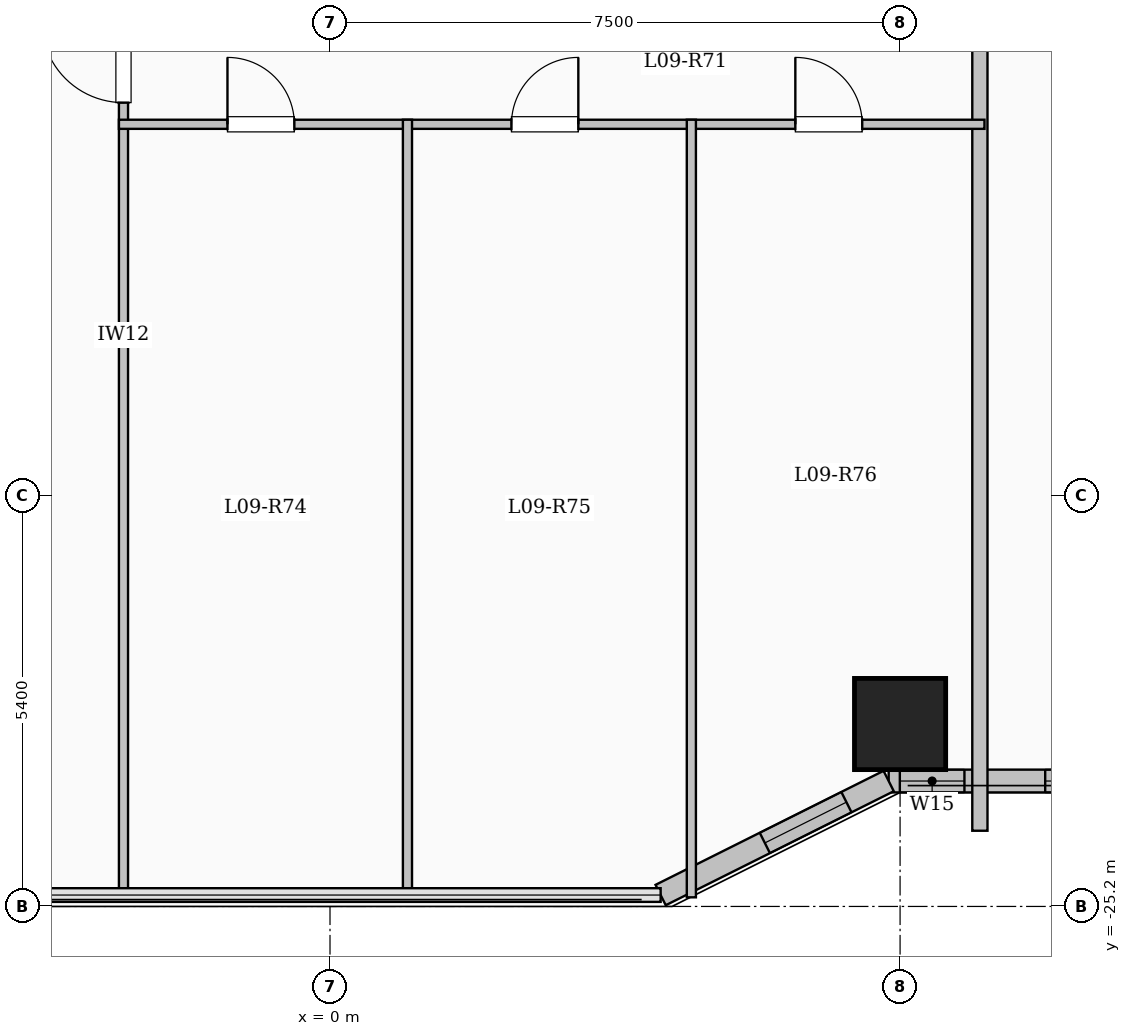
"""IFC4 building model, lengths in metres.
Left out: names, types, materials, properties, quantities, classifications, styles, units other than length and angle.
Written with IfcOpenShell. Run it as: python <this file> out.ifc"""

import sys

from ifc_helpers import new_model, si_unit, direction, frame, frame_2d, origin, origin_2d, place, context, subcontext, project, spatial, rectangle, extrude, element, fill, save


model = new_model("IFC4")
c1 = context("Model", 3, precision=1e-05, world=origin(), true_north=direction((0.0, 1.0)))
c2 = subcontext(c1, "Body", "Model", "MODEL_VIEW")
j1 = project(units=[si_unit("LENGTHUNIT", "METRE"), si_unit("PLANEANGLEUNIT", "RADIAN")], contexts=[c1])
p1 = place(None, origin())
s1 = spatial("IfcSite", under=j1, at=p1, CompositionType="ELEMENT")
p2 = place(p1, origin())
s2 = spatial("IfcBuilding", under=s1, at=p2, CompositionType="ELEMENT")
p3 = place(p2, frame((0.0, 0.0, 37.4)))
s3 = spatial("IfcBuildingStorey", under=s2, at=p3, CompositionType="ELEMENT", Elevation=37.4)
p4 = place(p3, frame((7.5, -22.8, 0.0), z_axis=(0.0, 0.0, 1.0), x_axis=(1.0, 0.0, 0.0)))
e1 = element("IfcColumn", 1, at=p4, inside=s3, PredefinedType="COLUMN", context=c2, shape_type="SweptSolid", body=[
    extrude(rectangle(XDim=1.2, YDim=1.2, at=origin_2d()), origin(), (0.0, 0.0, 1.0), 3.35),
])
p5 = place(p3, frame((22.65, -23.55, 0.0), z_axis=(0.0, 0.0, 1.0), x_axis=(-1.0, 0.0, 0.0)))
e2 = element("IfcWall", 2, at=p5, inside=s3, PredefinedType="SOLIDWALL", context=c2, shape_type="SweptSolid", body=[
    extrude(rectangle(XDim=15.3, YDim=0.3, at=frame_2d((7.65, 0.0))), origin(), (0.0, 0.0, 1.0), 3.1),
])
p6 = place(p5, frame((0.88, 0.0, 0.9)))
e3 = element("IfcOpeningElement", 3, at=p6, cuts=e2, PredefinedType="OPENING", context=c2, shape_type="SweptSolid", body=[
    extrude(rectangle(XDim=1.5, YDim=1.65, at=frame_2d((0.75, 0.825))), frame((0.0, 0.16, 0.0), z_axis=(0.0, -1.0, 0.0), x_axis=(1.0, 0.0, 0.0)), (0.0, 0.0, 1.0), 0.32),
])
p7 = place(p5, frame((4.091, 0.0, 0.9)))
e4 = element("IfcOpeningElement", 4, at=p7, cuts=e2, PredefinedType="OPENING", context=c2, shape_type="SweptSolid", body=[
    extrude(rectangle(XDim=1.5, YDim=1.65, at=frame_2d((0.75, 0.825))), frame((0.0, 0.16, 0.0), z_axis=(0.0, -1.0, 0.0), x_axis=(1.0, 0.0, 0.0)), (0.0, 0.0, 1.0), 0.32),
])
p8 = place(p5, frame((7.045, 0.0, 0.95)))
e5 = element("IfcOpeningElement", 5, at=p8, cuts=e2, PredefinedType="OPENING", context=c2, shape_type="SweptSolid", body=[
    extrude(rectangle(XDim=1.2, YDim=1.5, at=frame_2d((0.6, 0.75))), frame((0.0, 0.16, 0.0), z_axis=(0.0, -1.0, 0.0), x_axis=(1.0, 0.0, 0.0)), (0.0, 0.0, 1.0), 0.32),
])
p9 = place(p5, frame((9.212, 0.0, 0.95)))
e6 = element("IfcOpeningElement", 6, at=p9, cuts=e2, PredefinedType="OPENING", context=c2, shape_type="SweptSolid", body=[
    extrude(rectangle(XDim=1.2, YDim=1.5, at=frame_2d((0.6, 0.75))), frame((0.0, 0.16, 0.0), z_axis=(0.0, -1.0, 0.0), x_axis=(1.0, 0.0, 0.0)), (0.0, 0.0, 1.0), 0.32),
])
p10 = place(p5, frame((11.741, 0.0, 0.9)))
e7 = element("IfcOpeningElement", 7, at=p10, cuts=e2, PredefinedType="OPENING", context=c2, shape_type="SweptSolid", body=[
    extrude(rectangle(XDim=1.5, YDim=1.65, at=frame_2d((0.75, 0.825))), frame((0.0, 0.16, 0.0), z_axis=(0.0, -1.0, 0.0), x_axis=(1.0, 0.0, 0.0)), (0.0, 0.0, 1.0), 0.32),
])
p11 = place(p5, frame((14.303, 0.0, 0.95)))
e8 = element("IfcOpeningElement", 8, at=p11, cuts=e2, PredefinedType="OPENING", context=c2, shape_type="SweptSolid", body=[
    extrude(rectangle(XDim=0.85, YDim=1.5, at=frame_2d((0.425, 0.75))), frame((0.0, 0.16, 0.0), z_axis=(0.0, -1.0, 0.0), x_axis=(1.0, 0.0, 0.0)), (0.0, 0.0, 1.0), 0.32),
])
p12 = place(p3, frame((7.35, -23.55, 0.0), z_axis=(0.0, 0.0, 1.0), x_axis=(-0.894427191, -0.4472135955, 0.0)))
e9 = element("IfcWall", 9, at=p12, inside=s3, PredefinedType="SOLIDWALL", context=c2, shape_type="SweptSolid", body=[
    extrude(rectangle(XDim=3.354, YDim=0.3, at=frame_2d((1.677, 0.0))), origin(), (0.0, 0.0, 1.0), 3.1),
])
p13 = place(p12, frame((0.622, 0.0, 0.95)))
e10 = element("IfcOpeningElement", 10, at=p13, cuts=e9, PredefinedType="OPENING", context=c2, shape_type="SweptSolid", body=[
    extrude(rectangle(XDim=1.2, YDim=1.5, at=frame_2d((0.6, 0.75))), frame((0.0, 0.16, 0.0), z_axis=(0.0, -1.0, 0.0), x_axis=(1.0, 0.0, 0.0)), (0.0, 0.0, 1.0), 0.32),
])
p14 = place(p3, frame((8.55, -24.204, 0.0), z_axis=(0.0, 0.0, 1.0), x_axis=(0.0, 1.0, 0.0)))
e11 = element("IfcWall", 11, at=p14, inside=s3, PredefinedType="SOLIDWALL", context=c2, shape_type="SweptSolid", body=[
    extrude(rectangle(XDim=13.854, YDim=0.2, at=frame_2d((6.927, 0.0))), origin(), (0.0, 0.0, 1.0), 3.1),
])
p15 = place(p3, frame((-2.717, -25.08, 0.0), z_axis=(0.0, 0.0, 1.0), x_axis=(0.0, 1.0, 0.0)))
e12 = element("IfcWall", 12, at=p15, inside=s3, PredefinedType="PARTITIONING", context=c2, shape_type="SweptSolid", body=[
    extrude(rectangle(XDim=14.79, YDim=0.12, at=frame_2d((7.395, 0.0))), origin(), (0.0, 0.0, 1.0), 3.1),
])
p16 = place(p15, frame((10.455, 0.0, 0.0)))
e13 = element("IfcOpeningElement", 13, at=p16, cuts=e12, PredefinedType="OPENING", context=c2, shape_type="SweptSolid", body=[
    extrude(rectangle(XDim=1.08, YDim=2.15, at=frame_2d((0.54, 1.075))), frame((0.0, 0.07, 0.0), z_axis=(0.0, -1.0, 0.0), x_axis=(1.0, 0.0, 0.0)), (0.0, 0.0, 1.0), 0.14),
])
p17 = place(p3, frame((-2.777, -14.91, 0.0), z_axis=(0.0, 0.0, 1.0), x_axis=(1.0, 0.0, 0.0)))
e14 = element("IfcWall", 14, at=p17, inside=s3, PredefinedType="PARTITIONING", context=c2, shape_type="SweptSolid", body=[
    extrude(rectangle(XDim=11.387, YDim=0.12, at=frame_2d((5.694, 0.0))), origin(), (0.0, 0.0, 1.0), 2.585),
])
p18 = place(p17, frame((1.428, 0.0, 0.0)))
e15 = element("IfcOpeningElement", 15, at=p18, cuts=e14, PredefinedType="OPENING", context=c2, shape_type="SweptSolid", body=[
    extrude(rectangle(XDim=0.88, YDim=2.1, at=frame_2d((0.44, 1.05))), frame((0.0, 0.07, 0.0), z_axis=(0.0, -1.0, 0.0), x_axis=(1.0, 0.0, 0.0)), (0.0, 0.0, 1.0), 0.14),
])
p19 = place(p17, frame((5.164, 0.0, 0.0)))
e16 = element("IfcOpeningElement", 16, at=p19, cuts=e14, PredefinedType="OPENING", context=c2, shape_type="SweptSolid", body=[
    extrude(rectangle(XDim=0.88, YDim=2.1, at=frame_2d((0.44, 1.05))), frame((0.0, 0.07, 0.0), z_axis=(0.0, -1.0, 0.0), x_axis=(1.0, 0.0, 0.0)), (0.0, 0.0, 1.0), 0.14),
])
p20 = place(p17, frame((8.899, 0.0, 0.0)))
e17 = element("IfcOpeningElement", 17, at=p20, cuts=e14, PredefinedType="OPENING", context=c2, shape_type="SweptSolid", body=[
    extrude(rectangle(XDim=0.88, YDim=2.1, at=frame_2d((0.44, 1.05))), frame((0.0, 0.07, 0.0), z_axis=(0.0, -1.0, 0.0), x_axis=(1.0, 0.0, 0.0)), (0.0, 0.0, 1.0), 0.14),
])
for number, where, z_axis, x_axis in (
    (18, (1.019, -25.08, 0.0), (0.0, 0.0, 1.0), (0.0, 1.0, 0.0)),
    (19, (4.754, -25.08, 0.0), (0.0, 0.0, 1.0), (0.0, 1.0, 0.0)),
):
    element("IfcWall", number, at=place(p3, frame(where, z_axis=z_axis, x_axis=x_axis)), inside=s3, PredefinedType="PARTITIONING", context=c2, shape_type="SweptSolid", body=[
        extrude(rectangle(XDim=10.23, YDim=0.12, at=frame_2d((5.115, 0.0))), origin(), (0.0, 0.0, 1.0), 3.1),
    ])
p21 = place(p10, origin())
e20 = element("IfcWindow", 20, at=p21, inside=s3, PartitioningType="SINGLE_PANEL", PredefinedType="WINDOW", context=c2, shape_type="SweptSolid", body=[
    extrude(rectangle(XDim=1.5, YDim=1.65, at=frame_2d((0.75, 0.825))), frame((0.0, 0.03, 0.0), z_axis=(0.0, -1.0, 0.0), x_axis=(1.0, 0.0, 0.0)), (0.0, 0.0, 1.0), 0.06),
])
fill(e7, e20)
p22 = place(p11, origin())
e21 = element("IfcWindow", 21, at=p22, inside=s3, PartitioningType="SINGLE_PANEL", PredefinedType="WINDOW", context=c2, shape_type="SweptSolid", body=[
    extrude(rectangle(XDim=0.85, YDim=1.5, at=frame_2d((0.425, 0.75))), frame((0.0, 0.03, 0.0), z_axis=(0.0, -1.0, 0.0), x_axis=(1.0, 0.0, 0.0)), (0.0, 0.0, 1.0), 0.06),
])
fill(e8, e21)
p23 = place(p13, origin())
e22 = element("IfcWindow", 22, at=p23, inside=s3, PartitioningType="SINGLE_PANEL", PredefinedType="WINDOW", context=c2, shape_type="SweptSolid", body=[
    extrude(rectangle(XDim=1.2, YDim=1.5, at=frame_2d((0.6, 0.75))), frame((0.0, 0.03, 0.0), z_axis=(0.0, -1.0, 0.0), x_axis=(1.0, 0.0, 0.0)), (0.0, 0.0, 1.0), 0.06),
])
fill(e10, e22)
p24 = place(p16, origin())
e23 = element("IfcDoor", 23, at=p24, inside=s3, OperationType="SINGLE_SWING_RIGHT", PredefinedType="DOOR", context=c2, shape_type="SweptSolid", body=[
    extrude(rectangle(XDim=1.08, YDim=2.15, at=frame_2d((0.54, 1.075))), frame((0.0, 0.025, 0.0), z_axis=(0.0, -1.0, 0.0), x_axis=(1.0, 0.0, 0.0)), (0.0, 0.0, 1.0), 0.05),
])
fill(e13, e23)
p25 = place(p18, origin())
e24 = element("IfcDoor", 24, at=p25, inside=s3, OperationType="SINGLE_SWING_LEFT", PredefinedType="DOOR", context=c2, shape_type="SweptSolid", body=[
    extrude(rectangle(XDim=0.88, YDim=2.1, at=frame_2d((0.44, 1.05))), frame((0.0, 0.025, 0.0), z_axis=(0.0, -1.0, 0.0), x_axis=(1.0, 0.0, 0.0)), (0.0, 0.0, 1.0), 0.05),
])
fill(e15, e24)
p26 = place(p19, origin())
e25 = element("IfcDoor", 25, at=p26, inside=s3, OperationType="SINGLE_SWING_RIGHT", PredefinedType="DOOR", context=c2, shape_type="SweptSolid", body=[
    extrude(rectangle(XDim=0.88, YDim=2.1, at=frame_2d((0.44, 1.05))), frame((0.0, 0.025, 0.0), z_axis=(0.0, -1.0, 0.0), x_axis=(1.0, 0.0, 0.0)), (0.0, 0.0, 1.0), 0.05),
])
fill(e16, e25)
p27 = place(p20, origin())
e26 = element("IfcDoor", 26, at=p27, inside=s3, OperationType="SINGLE_SWING_LEFT", PredefinedType="DOOR", context=c2, shape_type="SweptSolid", body=[
    extrude(rectangle(XDim=0.88, YDim=2.1, at=frame_2d((0.44, 1.05))), frame((0.0, 0.025, 0.0), z_axis=(0.0, -1.0, 0.0), x_axis=(1.0, 0.0, 0.0)), (0.0, 0.0, 1.0), 0.05),
])
fill(e17, e26)
save(model, sys.argv[1])
